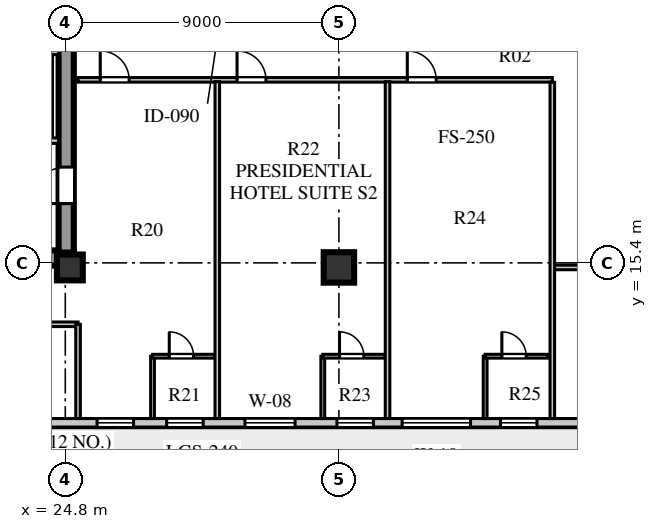
"""IFC4 building model, lengths in metres.
Left out: names, types, materials, properties, quantities, classifications, styles, units other than length and angle.
Written with IfcOpenShell. Run it as: python <this file> out.ifc"""

import sys

from ifc_helpers import new_model, si_unit, direction, frame, frame_2d, origin, origin_2d, place, context, subcontext, project, spatial, rectangle, extrude, element, fill, save


model = new_model("IFC4")
c1 = context("Model", 3, precision=1e-05, world=origin(), true_north=direction((0.0, 1.0)))
c2 = subcontext(c1, "Body", "Model", "MODEL_VIEW")
j1 = project(units=[si_unit("LENGTHUNIT", "METRE"), si_unit("PLANEANGLEUNIT", "RADIAN")], contexts=[c1])
p1 = place(None, origin())
s1 = spatial("IfcSite", under=j1, at=p1, CompositionType="ELEMENT")
p2 = place(p1, origin())
s2 = spatial("IfcBuilding", under=s1, at=p2, CompositionType="ELEMENT")
p3 = place(p2, frame((0.0, 0.0, 127.1)))
s3 = spatial("IfcBuildingStorey", under=s2, at=p3, CompositionType="ELEMENT", Elevation=127.1)
p4 = place(p3, frame((15.4, 15.56, 0.0), z_axis=(0.0, 0.0, 1.0), x_axis=(1.0, 0.0, 0.0)))
e1 = element("IfcWall", 1, at=p4, inside=s3, PredefinedType="SHEAR", context=c2, shape_type="SweptSolid", body=[
    extrude(rectangle(XDim=9.68, YDim=0.5, at=frame_2d((4.84, 0.0))), origin(), (0.0, 0.0, 1.0), 3.6),
])
p5 = place(p3, frame((24.83, 15.74, 0.0), z_axis=(0.0, 0.0, 1.0), x_axis=(0.0, 1.0, 0.0)))
e2 = element("IfcWall", 2, at=p5, inside=s3, PredefinedType="SHEAR", context=c2, shape_type="SweptSolid", body=[
    extrude(rectangle(XDim=25.76, YDim=0.5, at=frame_2d((12.88, 0.0))), origin(), (0.0, 0.0, 1.0), 3.6),
])
p6 = place(p5, frame((1.61, 0.0, 0.0)))
e3 = element("IfcOpeningElement", 3, at=p6, cuts=e2, PredefinedType="OPENING", context=c2, shape_type="SweptSolid", body=[
    extrude(rectangle(XDim=1.2, YDim=2.1, at=frame_2d((0.6, 1.05))), frame((0.0, 0.26, 0.0), z_axis=(0.0, -1.0, 0.0), x_axis=(1.0, 0.0, 0.0)), (0.0, 0.0, 1.0), 0.52),
])
p7 = place(p5, frame((6.78, 0.0, 0.0)))
e4 = element("IfcOpeningElement", 4, at=p7, cuts=e2, PredefinedType="OPENING", context=c2, shape_type="SweptSolid", body=[
    extrude(rectangle(XDim=0.85, YDim=2.06, at=frame_2d((0.425, 1.03))), frame((0.0, 0.26, 0.0), z_axis=(0.0, -1.0, 0.0), x_axis=(1.0, 0.0, 0.0)), (0.0, 0.0, 1.0), 0.52),
])
p8 = place(p5, frame((12.11, 0.0, 0.0)))
e5 = element("IfcOpeningElement", 5, at=p8, cuts=e2, PredefinedType="OPENING", context=c2, shape_type="SweptSolid", body=[
    extrude(rectangle(XDim=1.5, YDim=2.12, at=frame_2d((0.75, 1.06))), frame((0.0, 0.26, 0.0), z_axis=(0.0, -1.0, 0.0), x_axis=(1.0, 0.0, 0.0)), (0.0, 0.0, 1.0), 0.52),
])
p9 = place(p5, frame((20.11, 0.0, 0.0)))
e6 = element("IfcOpeningElement", 6, at=p9, cuts=e2, PredefinedType="OPENING", context=c2, shape_type="SweptSolid", body=[
    extrude(rectangle(XDim=1.2, YDim=2.12, at=frame_2d((0.6, 1.06))), frame((0.0, 0.26, 0.0), z_axis=(0.0, -1.0, 0.0), x_axis=(1.0, 0.0, 0.0)), (0.0, 0.0, 1.0), 0.52),
])
p10 = place(p5, frame((24.01, 0.0, 0.0)))
e7 = element("IfcOpeningElement", 7, at=p10, cuts=e2, PredefinedType="OPENING", context=c2, shape_type="SweptSolid", body=[
    extrude(rectangle(XDim=0.95, YDim=2.1, at=frame_2d((0.475, 1.05))), frame((0.0, 0.26, 0.0), z_axis=(0.0, -1.0, 0.0), x_axis=(1.0, 0.0, 0.0)), (0.0, 0.0, 1.0), 0.52),
])
p11 = place(p3, frame((24.95, 15.25, 0.0), z_axis=(0.0, 0.0, 1.0), x_axis=(1.0, 0.0, 0.0)))
e8 = element("IfcColumn", 8, at=p11, inside=s3, PredefinedType="COLUMN", context=c2, shape_type="SweptSolid", body=[
    extrude(rectangle(XDim=0.85, YDim=0.85, at=origin_2d()), origin(), (0.0, 0.0, 1.0), 3.6),
])
p12 = place(p3, frame((33.8, 15.25, 0.0), z_axis=(0.0, 0.0, 1.0), x_axis=(1.0, 0.0, 0.0)))
e9 = element("IfcColumn", 9, at=p12, inside=s3, PredefinedType="COLUMN", context=c2, shape_type="SweptSolid", body=[
    extrude(rectangle(XDim=1.0, YDim=1.0, at=origin_2d()), origin(), (0.0, 0.0, 1.0), 3.6),
])
p13 = place(p3, frame((13.25, 10.14, 0.0), z_axis=(0.0, 0.0, 1.0), x_axis=(1.0, 0.0, 0.0)))
e10 = element("IfcWall", 10, at=p13, inside=s3, PredefinedType="STANDARD", context=c2, shape_type="SweptSolid", body=[
    extrude(rectangle(XDim=32.1, YDim=0.28, at=frame_2d((16.05, 0.0))), origin(), (0.0, 0.0, 1.0), 3.6),
])
p14 = place(p13, frame((0.95, 0.0, 0.0)))
e11 = element("IfcOpeningElement", 11, at=p14, cuts=e10, PredefinedType="OPENING", context=c2, shape_type="SweptSolid", body=[
    extrude(rectangle(XDim=1.0, YDim=2.05, at=frame_2d((0.5, 1.025))), frame((0.0, 0.15, 0.0), z_axis=(0.0, -1.0, 0.0), x_axis=(1.0, 0.0, 0.0)), (0.0, 0.0, 1.0), 0.3),
])
p15 = place(p13, frame((5.73, 0.0, 0.8)))
e12 = element("IfcOpeningElement", 12, at=p15, cuts=e10, PredefinedType="OPENING", context=c2, shape_type="SweptSolid", body=[
    extrude(rectangle(XDim=2.4, YDim=2.05, at=frame_2d((1.2, 1.025))), frame((0.0, 0.15, 0.0), z_axis=(0.0, -1.0, 0.0), x_axis=(1.0, 0.0, 0.0)), (0.0, 0.0, 1.0), 0.3),
])
p16 = place(p13, frame((12.595, 0.0, 0.8)))
e13 = element("IfcOpeningElement", 13, at=p16, cuts=e10, PredefinedType="OPENING", context=c2, shape_type="SweptSolid", body=[
    extrude(rectangle(XDim=1.2, YDim=1.75, at=frame_2d((0.6, 0.875))), frame((0.0, 0.15, 0.0), z_axis=(0.0, -1.0, 0.0), x_axis=(1.0, 0.0, 0.0)), (0.0, 0.0, 1.0), 0.3),
])
p17 = place(p13, frame((14.885, 0.0, 0.8)))
e14 = element("IfcOpeningElement", 14, at=p17, cuts=e10, PredefinedType="OPENING", context=c2, shape_type="SweptSolid", body=[
    extrude(rectangle(XDim=1.2, YDim=1.75, at=frame_2d((0.6, 0.875))), frame((0.0, 0.15, 0.0), z_axis=(0.0, -1.0, 0.0), x_axis=(1.0, 0.0, 0.0)), (0.0, 0.0, 1.0), 0.3),
])
p18 = place(p13, frame((17.46, 0.0, 0.8)))
e15 = element("IfcOpeningElement", 15, at=p18, cuts=e10, PredefinedType="OPENING", context=c2, shape_type="SweptSolid", body=[
    extrude(rectangle(XDim=1.65, YDim=1.95, at=frame_2d((0.825, 0.975))), frame((0.0, 0.15, 0.0), z_axis=(0.0, -1.0, 0.0), x_axis=(1.0, 0.0, 0.0)), (0.0, 0.0, 1.0), 0.3),
])
p19 = place(p13, frame((20.485, 0.0, 0.8)))
e16 = element("IfcOpeningElement", 16, at=p19, cuts=e10, PredefinedType="OPENING", context=c2, shape_type="SweptSolid", body=[
    extrude(rectangle(XDim=1.2, YDim=1.75, at=frame_2d((0.6, 0.875))), frame((0.0, 0.15, 0.0), z_axis=(0.0, -1.0, 0.0), x_axis=(1.0, 0.0, 0.0)), (0.0, 0.0, 1.0), 0.3),
])
p20 = place(p13, frame((22.63, 0.0, 0.8)))
e17 = element("IfcOpeningElement", 17, at=p20, cuts=e10, PredefinedType="OPENING", context=c2, shape_type="SweptSolid", body=[
    extrude(rectangle(XDim=2.25, YDim=2.0, at=frame_2d((1.125, 1.0))), frame((0.0, 0.15, 0.0), z_axis=(0.0, -1.0, 0.0), x_axis=(1.0, 0.0, 0.0)), (0.0, 0.0, 1.0), 0.3),
])
p21 = place(p13, frame((25.865, 0.0, 0.8)))
e18 = element("IfcOpeningElement", 18, at=p21, cuts=e10, PredefinedType="OPENING", context=c2, shape_type="SweptSolid", body=[
    extrude(rectangle(XDim=1.2, YDim=1.75, at=frame_2d((0.6, 0.875))), frame((0.0, 0.15, 0.0), z_axis=(0.0, -1.0, 0.0), x_axis=(1.0, 0.0, 0.0)), (0.0, 0.0, 1.0), 0.3),
])
p22 = place(p13, frame((29.03, 0.0, 0.8)))
e19 = element("IfcOpeningElement", 19, at=p22, cuts=e10, PredefinedType="OPENING", context=c2, shape_type="SweptSolid", body=[
    extrude(rectangle(XDim=1.5, YDim=2.0, at=frame_2d((0.75, 1.0))), frame((0.0, 0.15, 0.0), z_axis=(0.0, -1.0, 0.0), x_axis=(1.0, 0.0, 0.0)), (0.0, 0.0, 1.0), 0.3),
])
p23 = place(p3, frame((19.64, 19.42, 0.0), z_axis=(0.0, 0.0, 1.0), x_axis=(1.0, 0.0, 0.0)))
e20 = element("IfcWall", 20, at=p23, inside=s3, PredefinedType="SOLIDWALL", context=c2, shape_type="SweptSolid", body=[
    extrude(rectangle(XDim=4.94, YDim=0.18, at=frame_2d((2.47, 0.0))), origin(), (0.0, 0.0, 1.0), 3.6),
])
p24 = place(p23, frame((0.72, 0.0, 0.0)))
e21 = element("IfcOpeningElement", 21, at=p24, cuts=e20, PredefinedType="OPENING", context=c2, shape_type="SweptSolid", body=[
    extrude(rectangle(XDim=1.1, YDim=2.1, at=frame_2d((0.55, 1.05))), frame((0.0, 0.1, 0.0), z_axis=(0.0, -1.0, 0.0), x_axis=(1.0, 0.0, 0.0)), (0.0, 0.0, 1.0), 0.2),
])
p25 = place(p23, frame((3.02, 0.0, 0.0)))
e22 = element("IfcOpeningElement", 22, at=p25, cuts=e20, PredefinedType="OPENING", context=c2, shape_type="SweptSolid", body=[
    extrude(rectangle(XDim=1.1, YDim=2.1, at=frame_2d((0.55, 1.05))), frame((0.0, 0.1, 0.0), z_axis=(0.0, -1.0, 0.0), x_axis=(1.0, 0.0, 0.0)), (0.0, 0.0, 1.0), 0.2),
])
p26 = place(p3, frame((19.64, 22.34, 0.0), z_axis=(0.0, 0.0, 1.0), x_axis=(1.0, 0.0, 0.0)))
e23 = element("IfcWall", 23, at=p26, inside=s3, PredefinedType="SOLIDWALL", context=c2, shape_type="SweptSolid", body=[
    extrude(rectangle(XDim=4.94, YDim=0.18, at=frame_2d((2.47, 0.0))), origin(), (0.0, 0.0, 1.0), 3.6),
])
p27 = place(p3, frame((25.22, 21.42, 0.0), z_axis=(0.0, 0.0, 1.0), x_axis=(1.0, 0.0, 0.0)))
e24 = element("IfcWall", 24, at=p27, inside=s3, PredefinedType="PARTITIONING", context=c2, shape_type="SweptSolid", body=[
    extrude(rectangle(XDim=15.6, YDim=0.15, at=frame_2d((7.8, 0.0))), origin(), (0.0, 0.0, 1.0), 3.2),
])
p28 = place(p27, frame((0.73, 0.0, 0.0)))
e25 = element("IfcOpeningElement", 25, at=p28, cuts=e24, PredefinedType="OPENING", context=c2, shape_type="SweptSolid", body=[
    extrude(rectangle(XDim=0.95, YDim=2.1, at=frame_2d((0.475, 1.05))), frame((0.0, 0.085, 0.0), z_axis=(0.0, -1.0, 0.0), x_axis=(1.0, 0.0, 0.0)), (0.0, 0.0, 1.0), 0.17),
])
p29 = place(p27, frame((5.23, 0.0, 0.0)))
e26 = element("IfcOpeningElement", 26, at=p29, cuts=e24, PredefinedType="OPENING", context=c2, shape_type="SweptSolid", body=[
    extrude(rectangle(XDim=0.95, YDim=2.1, at=frame_2d((0.475, 1.05))), frame((0.0, 0.085, 0.0), z_axis=(0.0, -1.0, 0.0), x_axis=(1.0, 0.0, 0.0)), (0.0, 0.0, 1.0), 0.17),
])
p30 = place(p27, frame((10.83, 0.0, 0.0)))
e27 = element("IfcOpeningElement", 27, at=p30, cuts=e24, PredefinedType="OPENING", context=c2, shape_type="SweptSolid", body=[
    extrude(rectangle(XDim=0.95, YDim=2.1, at=frame_2d((0.475, 1.05))), frame((0.0, 0.085, 0.0), z_axis=(0.0, -1.0, 0.0), x_axis=(1.0, 0.0, 0.0)), (0.0, 0.0, 1.0), 0.17),
])
p31 = place(p3, frame((40.82, 15.25, 0.0), z_axis=(0.0, 0.0, 1.0), x_axis=(1.0, 0.0, 0.0)))
e28 = element("IfcWall", 28, at=p31, inside=s3, PredefinedType="PARTITIONING", context=c2, shape_type="SweptSolid", body=[
    extrude(rectangle(XDim=7.3, YDim=0.15, at=frame_2d((3.65, 0.0))), origin(), (0.0, 0.0, 1.0), 2.95),
])
p32 = place(p3, frame((13.59, 13.38, 0.0), z_axis=(0.0, 0.0, 1.0), x_axis=(1.0, 0.0, 0.0)))
e29 = element("IfcWall", 29, at=p32, inside=s3, PredefinedType="PARTITIONING", context=c2, shape_type="SweptSolid", body=[
    extrude(rectangle(XDim=11.63, YDim=0.15, at=frame_2d((5.815, 0.0))), origin(), (0.0, 0.0, 1.0), 3.6),
])
p33 = place(p32, frame((4.56, 0.0, 0.0)))
e30 = element("IfcOpeningElement", 30, at=p33, cuts=e29, PredefinedType="OPENING", context=c2, shape_type="SweptSolid", body=[
    extrude(rectangle(XDim=1.0, YDim=2.08, at=frame_2d((0.5, 1.04))), frame((0.0, 0.085, 0.0), z_axis=(0.0, -1.0, 0.0), x_axis=(1.0, 0.0, 0.0)), (0.0, 0.0, 1.0), 0.17),
])
p34 = place(p3, frame((25.22, 10.28, 0.0), z_axis=(0.0, 0.0, 1.0), x_axis=(0.0, 1.0, 0.0)))
e31 = element("IfcWall", 31, at=p34, inside=s3, PredefinedType="PARTITIONING", context=c2, shape_type="SweptSolid", body=[
    extrude(rectangle(XDim=3.1, YDim=0.15, at=frame_2d((1.55, 0.0))), origin(), (0.0, 0.0, 1.0), 3.1),
])
p35 = place(p3, frame((40.82, 10.28, 0.0), z_axis=(0.0, 0.0, 1.0), x_axis=(0.0, 1.0, 0.0)))
e32 = element("IfcWall", 32, at=p35, inside=s3, PredefinedType="PARTITIONING", context=c2, shape_type="SweptSolid", body=[
    extrude(rectangle(XDim=11.06, YDim=0.15, at=frame_2d((5.53, 0.0))), origin(), (0.0, 0.0, 1.0), 3.6),
])
p36 = place(p3, frame((27.67, 10.28, 0.0), z_axis=(0.0, 0.0, 1.0), x_axis=(0.0, 1.0, 0.0)))
e33 = element("IfcWall", 33, at=p36, inside=s3, PredefinedType="PLUMBINGWALL", context=c2, shape_type="SweptSolid", body=[
    extrude(rectangle(XDim=2.05, YDim=0.125, at=frame_2d((1.025, 0.0))), origin(), (0.0, 0.0, 1.0), 3.6),
])
p37 = place(p3, frame((27.67, 12.33, 0.0), z_axis=(0.0, 0.0, 1.0), x_axis=(1.0, 0.0, 0.0)))
e34 = element("IfcWall", 34, at=p37, inside=s3, PredefinedType="PLUMBINGWALL", context=c2, shape_type="SweptSolid", body=[
    extrude(rectangle(XDim=2.05, YDim=0.125, at=frame_2d((1.025, 0.0))), origin(), (0.0, 0.0, 1.0), 3.6),
])
p38 = place(p37, frame((0.55, 0.0, 0.0)))
e35 = element("IfcOpeningElement", 35, at=p38, cuts=e34, PredefinedType="OPENING", context=c2, shape_type="SweptSolid", body=[
    extrude(rectangle(XDim=0.8, YDim=2.05, at=frame_2d((0.4, 1.025))), frame((0.0, 0.073, 0.0), z_axis=(0.0, -1.0, 0.0), x_axis=(1.0, 0.0, 0.0)), (0.0, 0.0, 1.0), 0.145),
])
p39 = place(p3, frame((29.8, 10.28, 0.0), z_axis=(0.0, 0.0, 1.0), x_axis=(0.0, 1.0, 0.0)))
e36 = element("IfcWall", 36, at=p39, inside=s3, PredefinedType="PARTITIONING", context=c2, shape_type="SweptSolid", body=[
    extrude(rectangle(XDim=11.08, YDim=0.15, at=frame_2d((5.54, 0.0))), origin(), (0.0, 0.0, 1.0), 3.6),
])
p40 = place(p3, frame((33.27, 10.28, 0.0), z_axis=(0.0, 0.0, 1.0), x_axis=(0.0, 1.0, 0.0)))
e37 = element("IfcWall", 37, at=p40, inside=s3, PredefinedType="PLUMBINGWALL", context=c2, shape_type="SweptSolid", body=[
    extrude(rectangle(XDim=2.05, YDim=0.125, at=frame_2d((1.025, 0.0))), origin(), (0.0, 0.0, 1.0), 3.6),
])
p41 = place(p3, frame((33.27, 12.33, 0.0), z_axis=(0.0, 0.0, 1.0), x_axis=(1.0, 0.0, 0.0)))
e38 = element("IfcWall", 38, at=p41, inside=s3, PredefinedType="PLUMBINGWALL", context=c2, shape_type="SweptSolid", body=[
    extrude(rectangle(XDim=2.05, YDim=0.125, at=frame_2d((1.025, 0.0))), origin(), (0.0, 0.0, 1.0), 3.6),
])
p42 = place(p41, frame((0.55, 0.0, 0.0)))
e39 = element("IfcOpeningElement", 39, at=p42, cuts=e38, PredefinedType="OPENING", context=c2, shape_type="SweptSolid", body=[
    extrude(rectangle(XDim=0.8, YDim=2.05, at=frame_2d((0.4, 1.025))), frame((0.0, 0.073, 0.0), z_axis=(0.0, -1.0, 0.0), x_axis=(1.0, 0.0, 0.0)), (0.0, 0.0, 1.0), 0.145),
])
p43 = place(p3, frame((35.4, 10.28, 0.0), z_axis=(0.0, 0.0, 1.0), x_axis=(0.0, 1.0, 0.0)))
e40 = element("IfcWall", 40, at=p43, inside=s3, PredefinedType="PARTITIONING", context=c2, shape_type="SweptSolid", body=[
    extrude(rectangle(XDim=11.08, YDim=0.15, at=frame_2d((5.54, 0.0))), origin(), (0.0, 0.0, 1.0), 3.6),
])
p44 = place(p3, frame((38.61, 10.28, 0.0), z_axis=(0.0, 0.0, 1.0), x_axis=(0.0, 1.0, 0.0)))
e41 = element("IfcWall", 41, at=p44, inside=s3, PredefinedType="PLUMBINGWALL", context=c2, shape_type="SweptSolid", body=[
    extrude(rectangle(XDim=2.05, YDim=0.125, at=frame_2d((1.025, 0.0))), origin(), (0.0, 0.0, 1.0), 3.6),
])
p45 = place(p3, frame((38.61, 12.33, 0.0), z_axis=(0.0, 0.0, 1.0), x_axis=(1.0, 0.0, 0.0)))
e42 = element("IfcWall", 42, at=p45, inside=s3, PredefinedType="PLUMBINGWALL", context=c2, shape_type="SweptSolid", body=[
    extrude(rectangle(XDim=2.05, YDim=0.125, at=frame_2d((1.025, 0.0))), origin(), (0.0, 0.0, 1.0), 3.6),
])
p46 = place(p45, frame((0.55, 0.0, 0.0)))
e43 = element("IfcOpeningElement", 43, at=p46, cuts=e42, PredefinedType="OPENING", context=c2, shape_type="SweptSolid", body=[
    extrude(rectangle(XDim=0.8, YDim=2.05, at=frame_2d((0.4, 1.025))), frame((0.0, 0.073, 0.0), z_axis=(0.0, -1.0, 0.0), x_axis=(1.0, 0.0, 0.0)), (0.0, 0.0, 1.0), 0.145),
])
p47 = place(p16, origin())
e44 = element("IfcWindow", 44, at=p47, inside=s3, PartitioningType="SINGLE_PANEL", PredefinedType="WINDOW", context=c2, shape_type="SweptSolid", body=[
    extrude(rectangle(XDim=1.2, YDim=1.75, at=frame_2d((0.6, 0.875))), frame((0.0, 0.03, 0.0), z_axis=(0.0, -1.0, 0.0), x_axis=(1.0, 0.0, 0.0)), (0.0, 0.0, 1.0), 0.06),
])
fill(e13, e44)
p48 = place(p17, origin())
e45 = element("IfcWindow", 45, at=p48, inside=s3, PartitioningType="SINGLE_PANEL", PredefinedType="WINDOW", context=c2, shape_type="SweptSolid", body=[
    extrude(rectangle(XDim=1.2, YDim=1.75, at=frame_2d((0.6, 0.875))), frame((0.0, 0.03, 0.0), z_axis=(0.0, -1.0, 0.0), x_axis=(1.0, 0.0, 0.0)), (0.0, 0.0, 1.0), 0.06),
])
fill(e14, e45)
p49 = place(p18, origin())
e46 = element("IfcWindow", 46, at=p49, inside=s3, PartitioningType="SINGLE_PANEL", PredefinedType="WINDOW", context=c2, shape_type="SweptSolid", body=[
    extrude(rectangle(XDim=1.65, YDim=1.95, at=frame_2d((0.825, 0.975))), frame((0.0, 0.03, 0.0), z_axis=(0.0, -1.0, 0.0), x_axis=(1.0, 0.0, 0.0)), (0.0, 0.0, 1.0), 0.06),
])
fill(e15, e46)
p50 = place(p19, origin())
e47 = element("IfcWindow", 47, at=p50, inside=s3, PartitioningType="SINGLE_PANEL", PredefinedType="WINDOW", context=c2, shape_type="SweptSolid", body=[
    extrude(rectangle(XDim=1.2, YDim=1.75, at=frame_2d((0.6, 0.875))), frame((0.0, 0.03, 0.0), z_axis=(0.0, -1.0, 0.0), x_axis=(1.0, 0.0, 0.0)), (0.0, 0.0, 1.0), 0.06),
])
fill(e16, e47)
p51 = place(p20, origin())
e48 = element("IfcWindow", 48, at=p51, inside=s3, PartitioningType="SINGLE_PANEL", PredefinedType="WINDOW", context=c2, shape_type="SweptSolid", body=[
    extrude(rectangle(XDim=2.25, YDim=2.0, at=frame_2d((1.125, 1.0))), frame((0.0, 0.03, 0.0), z_axis=(0.0, -1.0, 0.0), x_axis=(1.0, 0.0, 0.0)), (0.0, 0.0, 1.0), 0.06),
])
fill(e17, e48)
p52 = place(p21, origin())
e49 = element("IfcWindow", 49, at=p52, inside=s3, PartitioningType="SINGLE_PANEL", PredefinedType="WINDOW", context=c2, shape_type="SweptSolid", body=[
    extrude(rectangle(XDim=1.2, YDim=1.75, at=frame_2d((0.6, 0.875))), frame((0.0, 0.03, 0.0), z_axis=(0.0, -1.0, 0.0), x_axis=(1.0, 0.0, 0.0)), (0.0, 0.0, 1.0), 0.06),
])
fill(e18, e49)
p53 = place(p6, frame((1.2, 0.0, 0.0), z_axis=(0.0, 0.0, 1.0), x_axis=(-1.0, 0.0, 0.0)))
e50 = element("IfcDoor", 50, at=p53, inside=s3, OperationType="SINGLE_SWING_RIGHT", PredefinedType="DOOR", context=c2, shape_type="SweptSolid", body=[
    extrude(rectangle(XDim=1.2, YDim=2.1, at=frame_2d((0.6, 1.05))), frame((0.0, 0.025, 0.0), z_axis=(0.0, -1.0, 0.0), x_axis=(1.0, 0.0, 0.0)), (0.0, 0.0, 1.0), 0.05),
])
fill(e3, e50)
p54 = place(p28, frame((0.95, 0.0, 0.0), z_axis=(0.0, 0.0, 1.0), x_axis=(-1.0, 0.0, 0.0)))
e51 = element("IfcDoor", 51, at=p54, inside=s3, OperationType="SINGLE_SWING_RIGHT", PredefinedType="DOOR", context=c2, shape_type="SweptSolid", body=[
    extrude(rectangle(XDim=0.95, YDim=2.1, at=frame_2d((0.475, 1.05))), frame((0.0, 0.025, 0.0), z_axis=(0.0, -1.0, 0.0), x_axis=(1.0, 0.0, 0.0)), (0.0, 0.0, 1.0), 0.05),
])
fill(e25, e51)
p55 = place(p38, origin())
e52 = element("IfcDoor", 52, at=p55, inside=s3, OperationType="SINGLE_SWING_LEFT", PredefinedType="DOOR", context=c2, shape_type="SweptSolid", body=[
    extrude(rectangle(XDim=0.8, YDim=2.05, at=frame_2d((0.4, 1.025))), frame((0.0, 0.025, 0.0), z_axis=(0.0, -1.0, 0.0), x_axis=(1.0, 0.0, 0.0)), (0.0, 0.0, 1.0), 0.05),
])
fill(e35, e52)
p56 = place(p29, frame((0.95, 0.0, 0.0), z_axis=(0.0, 0.0, 1.0), x_axis=(-1.0, 0.0, 0.0)))
e53 = element("IfcDoor", 53, at=p56, inside=s3, OperationType="SINGLE_SWING_RIGHT", PredefinedType="DOOR", context=c2, shape_type="SweptSolid", body=[
    extrude(rectangle(XDim=0.95, YDim=2.1, at=frame_2d((0.475, 1.05))), frame((0.0, 0.025, 0.0), z_axis=(0.0, -1.0, 0.0), x_axis=(1.0, 0.0, 0.0)), (0.0, 0.0, 1.0), 0.05),
])
fill(e26, e53)
p57 = place(p42, origin())
e54 = element("IfcDoor", 54, at=p57, inside=s3, OperationType="SINGLE_SWING_LEFT", PredefinedType="DOOR", context=c2, shape_type="SweptSolid", body=[
    extrude(rectangle(XDim=0.8, YDim=2.05, at=frame_2d((0.4, 1.025))), frame((0.0, 0.025, 0.0), z_axis=(0.0, -1.0, 0.0), x_axis=(1.0, 0.0, 0.0)), (0.0, 0.0, 1.0), 0.05),
])
fill(e39, e54)
p58 = place(p30, frame((0.95, 0.0, 0.0), z_axis=(0.0, 0.0, 1.0), x_axis=(-1.0, 0.0, 0.0)))
e55 = element("IfcDoor", 55, at=p58, inside=s3, OperationType="SINGLE_SWING_RIGHT", PredefinedType="DOOR", context=c2, shape_type="SweptSolid", body=[
    extrude(rectangle(XDim=0.95, YDim=2.1, at=frame_2d((0.475, 1.05))), frame((0.0, 0.025, 0.0), z_axis=(0.0, -1.0, 0.0), x_axis=(1.0, 0.0, 0.0)), (0.0, 0.0, 1.0), 0.05),
])
fill(e27, e55)
p59 = place(p46, origin())
e56 = element("IfcDoor", 56, at=p59, inside=s3, OperationType="SINGLE_SWING_LEFT", PredefinedType="DOOR", context=c2, shape_type="SweptSolid", body=[
    extrude(rectangle(XDim=0.8, YDim=2.05, at=frame_2d((0.4, 1.025))), frame((0.0, 0.025, 0.0), z_axis=(0.0, -1.0, 0.0), x_axis=(1.0, 0.0, 0.0)), (0.0, 0.0, 1.0), 0.05),
])
fill(e43, e56)
save(model, sys.argv[1])
